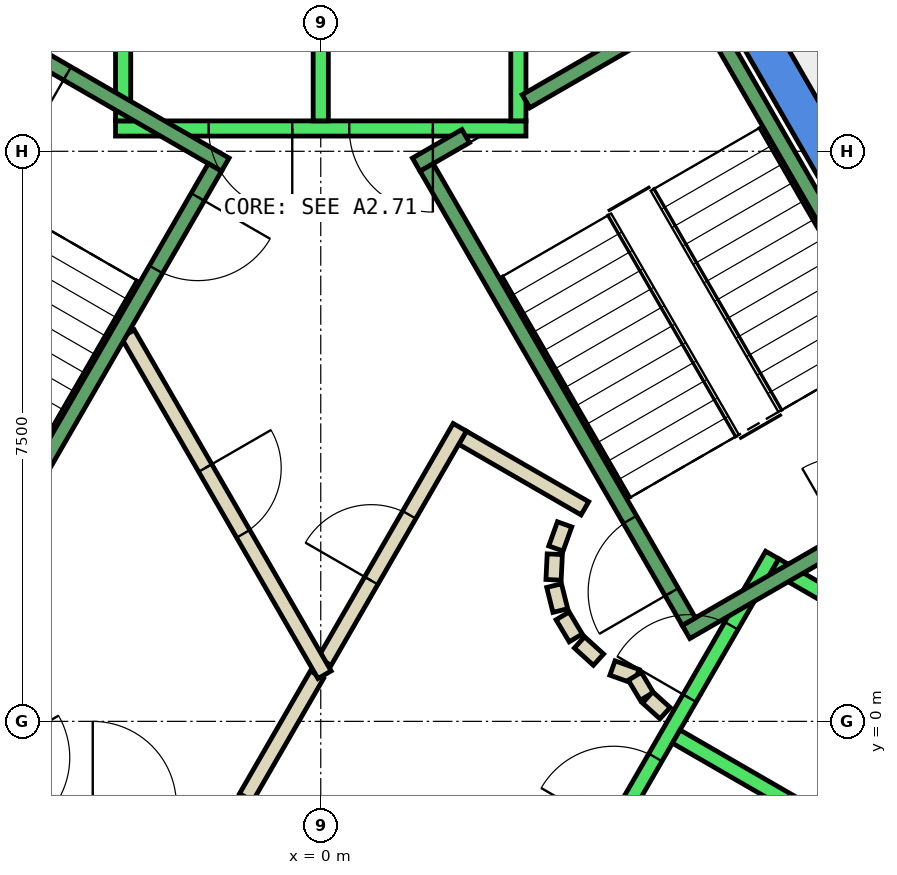
"""IFC4 building model, lengths in metres.
Left out: names, types, materials, properties, quantities, classifications, styles, units other than length and angle.
Written with IfcOpenShell. Run it as: python <this file> out.ifc"""

import sys

from ifc_helpers import new_model, si_unit, direction, frame, frame_2d, origin, place, context, subcontext, project, spatial, polyline, rectangle, outline, extrude, element, fill, save


model = new_model("IFC4")
c1 = context("Model", 3, precision=1e-05, world=origin(), true_north=direction((0.0, 1.0)))
c2 = subcontext(c1, "Body", "Model", "MODEL_VIEW")
j1 = project(units=[si_unit("LENGTHUNIT", "METRE"), si_unit("PLANEANGLEUNIT", "RADIAN")], contexts=[c1])
p1 = place(None, origin())
s1 = spatial("IfcSite", under=j1, at=p1, CompositionType="ELEMENT")
p2 = place(p1, origin())
s2 = spatial("IfcBuilding", under=s1, at=p2, CompositionType="ELEMENT")
p3 = place(p2, frame((0.0, 0.0, 335.9)))
s3 = spatial("IfcBuildingStorey", under=s2, at=p3, CompositionType="ELEMENT", Elevation=335.9)
p4 = place(p3, frame((0.0, 0.0, -0.35)))
e1 = element("IfcWall", 1, at=p4, inside=s3, PredefinedType="SHEAR", context=c2, shape_type="SweptSolid", body=[
    extrude(outline(polyline([(5.486, 9.998), (5.053, 9.748), (9.238, 2.5), (9.815, 2.5), (5.486, 9.998)])), origin(), (0.0, 0.0, 1.0), 4.4),
])
p5 = place(p3, frame((0.0, 0.0, -0.35)))
e2 = element("IfcWall", 2, at=p5, inside=s3, PredefinedType="SHEAR", context=c2, shape_type="SweptSolid", body=[
    extrude(outline(polyline([(4.907, -6.0), (9.815, 2.5), (9.238, 2.5), (4.619, -5.5), (4.907, -6.0)])), origin(), (0.0, 0.0, 1.0), 4.4),
])
p6 = place(p3, frame((-0.982, -1.0, 0.0), z_axis=(0.0, 0.0, 1.0), x_axis=(0.50024047865, 0.865886518847, 0.0)))
e3 = element("IfcWall", 3, at=p6, inside=s3, PredefinedType="PARTITIONING", context=c2, shape_type="SweptSolid", body=[
    extrude(rectangle(XDim=1.863, YDim=0.2, at=frame_2d((0.931, 0.0))), origin(), (0.0, 0.0, 1.0), 4.05),
])
p7 = place(p3, frame((1.866, 3.732, 0.0), z_axis=(0.0, 0.0, 1.0), x_axis=(0.866043361281, -0.499968895414, 0.0)))
e4 = element("IfcWall", 4, at=p7, inside=s3, PredefinedType="PARTITIONING", context=c2, shape_type="SweptSolid", body=[
    extrude(rectangle(XDim=1.858, YDim=0.2, at=frame_2d((0.929, 0.0))), origin(), (0.0, 0.0, 1.0), 4.05),
])
p8 = place(p3, frame((3.208, 2.592, 0.0), z_axis=(0.0, 0.0, 1.0), x_axis=(-0.337388820924, -0.941365382578, 0.0)))
e5 = element("IfcWall", 5, at=p8, inside=s3, PredefinedType="PARTITIONING", context=c2, shape_type="SweptSolid", body=[
    extrude(rectangle(XDim=0.338, YDim=0.2, at=frame_2d((0.169, 0.0))), origin(), (0.0, 0.0, 1.0), 4.05),
])
p9 = place(p3, frame((3.079, 2.199, 0.0), z_axis=(0.0, 0.0, 1.0), x_axis=(-0.047771483479, -0.998858290933, 0.0)))
e6 = element("IfcWall", 6, at=p9, inside=s3, PredefinedType="PARTITIONING", context=c2, shape_type="SweptSolid", body=[
    extrude(rectangle(XDim=0.337, YDim=0.2, at=frame_2d((0.169, 0.0))), origin(), (0.0, 0.0, 1.0), 4.05),
])
p10 = place(p3, frame((3.07, 1.786, 0.0), z_axis=(0.0, 0.0, 1.0), x_axis=(0.242705583207, -0.970099994784, 0.0)))
e7 = element("IfcWall", 7, at=p10, inside=s3, PredefinedType="PARTITIONING", context=c2, shape_type="SweptSolid", body=[
    extrude(rectangle(XDim=0.338, YDim=0.2, at=frame_2d((0.169, 0.0))), origin(), (0.0, 0.0, 1.0), 4.05),
])
for number, where, z_axis, x_axis in (
    (8, (3.182, 1.388, 0.0), (0.0, 0.0, 1.0), (0.512, -0.859, 0.0)),
    (9, (3.404, 1.039, 0.0), (0.0, 0.0, 1.0), (0.74, -0.672, 0.0)),
):
    element("IfcWall", number, at=place(p3, frame(where, z_axis=z_axis, x_axis=x_axis)), inside=s3, PredefinedType="PARTITIONING", context=c2, shape_type="SweptSolid", body=[
        extrude(rectangle(XDim=0.338, YDim=0.2, at=frame_2d((0.169, 0.0))), origin(), (0.0, 0.0, 1.0), 4.05),
    ])
p11 = place(p3, frame((3.838, 0.702, 0.0), z_axis=(0.0, 0.0, 1.0), x_axis=(0.941035081519, -0.338308993895, 0.0)))
e10 = element("IfcWall", 10, at=p11, inside=s3, PredefinedType="PARTITIONING", context=c2, shape_type="SweptSolid", body=[
    extrude(rectangle(XDim=0.337, YDim=0.2, at=frame_2d((0.168, 0.0))), origin(), (0.0, 0.0, 1.0), 4.05),
])
p12 = place(p3, frame((4.132, 0.593, 0.0), z_axis=(0.0, 0.0, 1.0), x_axis=(0.513561617048, -0.858052717201, 0.0)))
e11 = element("IfcWall", 11, at=p12, inside=s3, PredefinedType="PARTITIONING", context=c2, shape_type="SweptSolid", body=[
    extrude(rectangle(XDim=0.308, YDim=0.2, at=frame_2d((0.154, 0.0))), origin(), (0.0, 0.0, 1.0), 4.05),
])
p13 = place(p3, frame((4.301, 0.315, 0.0), z_axis=(0.0, 0.0, 1.0), x_axis=(0.741798017506, -0.670623367639, 0.0)))
e12 = element("IfcWall", 12, at=p13, inside=s3, PredefinedType="PARTITIONING", context=c2, shape_type="SweptSolid", body=[
    extrude(rectangle(XDim=0.309, YDim=0.2, at=frame_2d((0.154, 0.0))), origin(), (0.0, 0.0, 1.0), 4.05),
])
p14 = place(p3, frame((0.05, 0.787, 0.0), z_axis=(0.0, 0.0, 1.0), x_axis=(0.499954076797, 0.866051915934, 0.0)))
e13 = element("IfcWall", 13, at=p14, inside=s3, PredefinedType="PARTITIONING", context=c2, shape_type="SweptSolid", body=[
    extrude(rectangle(XDim=3.558, YDim=0.2, at=frame_2d((1.779, 0.0))), origin(), (0.0, 0.0, 1.0), 4.05),
])
p15 = place(p14, frame((1.229, 0.0, 0.0)))
e14 = element("IfcOpeningElement", 14, at=p15, cuts=e13, PredefinedType="OPENING", context=c2, shape_type="SweptSolid", body=[
    extrude(rectangle(XDim=1.0, YDim=2.1, at=frame_2d((0.5, 1.05))), frame((0.0, 0.11, 0.0), z_axis=(0.0, -1.0, 0.0), x_axis=(1.0, 0.0, 0.0)), (0.0, 0.0, 1.0), 0.22),
])
p16 = place(p3, frame((-2.54, 5.1, 0.0), z_axis=(0.0, 0.0, 1.0), x_axis=(0.499925051871, -0.866068670783, 0.0)))
e15 = element("IfcWall", 15, at=p16, inside=s3, PredefinedType="PARTITIONING", context=c2, shape_type="SweptSolid", body=[
    extrude(rectangle(XDim=5.181, YDim=0.2, at=frame_2d((2.59, 0.0))), origin(), (0.0, 0.0, 1.0), 4.05),
])
p17 = place(p16, frame((2.04, 0.0, 0.0)))
e16 = element("IfcOpeningElement", 16, at=p17, cuts=e15, PredefinedType="OPENING", context=c2, shape_type="SweptSolid", body=[
    extrude(rectangle(XDim=1.0, YDim=2.1, at=frame_2d((0.5, 1.05))), frame((0.0, 0.11, 0.0), z_axis=(0.0, -1.0, 0.0), x_axis=(1.0, 0.0, 0.0)), (0.0, 0.0, 1.0), 0.22),
])
p18 = place(p3, frame((2.7, 7.8, 0.0), z_axis=(0.0, 0.0, 1.0), x_axis=(-1.0, 0.0, 0.0)))
e17 = element("IfcWall", 17, at=p18, inside=s3, PredefinedType="STANDARD", context=c2, shape_type="SweptSolid", body=[
    extrude(rectangle(XDim=5.4, YDim=0.2, at=frame_2d((2.7, 0.0))), origin(), (0.0, 0.0, 1.0), 4.05),
])
p19 = place(p18, frame((1.225, 0.0, 0.0)))
e18 = element("IfcOpeningElement", 18, at=p19, cuts=e17, PredefinedType="OPENING", context=c2, shape_type="SweptSolid", body=[
    extrude(rectangle(XDim=1.1, YDim=2.1, at=frame_2d((0.55, 1.05))), frame((0.0, 0.11, 0.0), z_axis=(0.0, -1.0, 0.0), x_axis=(1.0, 0.0, 0.0)), (0.0, 0.0, 1.0), 0.22),
])
p20 = place(p18, frame((3.075, 0.0, 0.0)))
e19 = element("IfcOpeningElement", 19, at=p20, cuts=e17, PredefinedType="OPENING", context=c2, shape_type="SweptSolid", body=[
    extrude(rectangle(XDim=1.1, YDim=2.1, at=frame_2d((0.55, 1.05))), frame((0.0, 0.11, 0.0), z_axis=(0.0, -1.0, 0.0), x_axis=(1.0, 0.0, 0.0)), (0.0, 0.0, 1.0), 0.22),
])
for number, where, z_axis, x_axis in (
    (20, (2.6, 7.9, 0.0), (0.0, 0.0, 1.0), (0.0, 1.0, 0.0)),
    (21, (0.0, 7.9, 0.0), (0.0, 0.0, 1.0), (0.0, 1.0, 0.0)),
    (22, (-2.6, 7.9, 0.0), (0.0, 0.0, 1.0), (0.0, 1.0, 0.0)),
):
    element("IfcWall", number, at=place(p3, frame(where, z_axis=z_axis, x_axis=x_axis)), inside=s3, PredefinedType="STANDARD", context=c2, shape_type="SweptSolid", body=[
        extrude(rectangle(XDim=2.4, YDim=0.2, at=frame_2d((1.2, 0.0))), origin(), (0.0, 0.0, 1.0), 4.05),
    ])
p21 = place(p3, frame((-5.94, 2.188, 0.0), z_axis=(0.0, 0.0, 1.0), x_axis=(0.500034260056, -0.866005622828, 0.0)))
e23 = element("IfcWall", 23, at=p21, inside=s3, PredefinedType="STANDARD", context=c2, shape_type="SweptSolid", body=[
    extrude(rectangle(XDim=5.399, YDim=0.2, at=frame_2d((2.7, 0.0))), origin(), (0.0, 0.0, 1.0), 4.05),
])
p22 = place(p21, frame((3.075, 0.0, 0.0)))
e24 = element("IfcOpeningElement", 24, at=p22, cuts=e23, PredefinedType="OPENING", context=c2, shape_type="SweptSolid", body=[
    extrude(rectangle(XDim=1.1, YDim=2.1, at=frame_2d((0.55, 1.05))), frame((0.0, 0.11, 0.0), z_axis=(0.0, -1.0, 0.0), x_axis=(1.0, 0.0, 0.0)), (0.0, 0.0, 1.0), 0.22),
])
p23 = place(p21, frame((1.225, 0.0, 0.0)))
e25 = element("IfcOpeningElement", 25, at=p23, cuts=e23, PredefinedType="OPENING", context=c2, shape_type="SweptSolid", body=[
    extrude(rectangle(XDim=1.1, YDim=2.1, at=frame_2d((0.55, 1.05))), frame((0.0, 0.11, 0.0), z_axis=(0.0, -1.0, 0.0), x_axis=(1.0, 0.0, 0.0)), (0.0, 0.0, 1.0), 0.22),
])
p24 = place(p3, frame((3.24, -2.488, 0.0), z_axis=(0.0, 0.0, 1.0), x_axis=(0.500034260056, 0.866005622828, 0.0)))
e26 = element("IfcWall", 26, at=p24, inside=s3, PredefinedType="STANDARD", context=c2, shape_type="SweptSolid", body=[
    extrude(rectangle(XDim=5.399, YDim=0.2, at=frame_2d((2.7, 0.0))), origin(), (0.0, 0.0, 1.0), 4.05),
])
p25 = place(p24, frame((3.225, 0.0, 0.0)))
e27 = element("IfcOpeningElement", 27, at=p25, cuts=e26, PredefinedType="OPENING", context=c2, shape_type="SweptSolid", body=[
    extrude(rectangle(XDim=1.1, YDim=2.1, at=frame_2d((0.55, 1.05))), frame((0.0, 0.11, 0.0), z_axis=(0.0, -1.0, 0.0), x_axis=(1.0, 0.0, 0.0)), (0.0, 0.0, 1.0), 0.22),
])
p26 = place(p24, frame((1.225, 0.0, 0.0)))
e28 = element("IfcOpeningElement", 28, at=p26, cuts=e26, PredefinedType="OPENING", context=c2, shape_type="SweptSolid", body=[
    extrude(rectangle(XDim=1.1, YDim=2.1, at=frame_2d((0.55, 1.05))), frame((0.0, 0.11, 0.0), z_axis=(0.0, -1.0, 0.0), x_axis=(1.0, 0.0, 0.0)), (0.0, 0.0, 1.0), 0.22),
])
p27 = place(p3, frame((5.492, -3.788, 0.0), z_axis=(0.0, 0.0, 1.0), x_axis=(0.500034260056, 0.866005622828, 0.0)))
e29 = element("IfcWall", 29, at=p27, inside=s3, PredefinedType="STANDARD", context=c2, shape_type="SweptSolid", body=[
    extrude(rectangle(XDim=5.399, YDim=0.2, at=frame_2d((2.7, 0.0))), origin(), (0.0, 0.0, 1.0), 4.05),
])
for number, where, z_axis, x_axis in (
    (30, (4.677, -0.2, 0.0), (0.0, 0.0, 1.0), (0.866, -0.5, 0.0)),
    (31, (5.977, 2.052, 0.0), (0.0, 0.0, 1.0), (0.866, -0.5, 0.0)),
):
    element("IfcWall", number, at=place(p3, frame(where, z_axis=z_axis, x_axis=x_axis)), inside=s3, PredefinedType="STANDARD", context=c2, shape_type="SweptSolid", body=[
        extrude(rectangle(XDim=2.399, YDim=0.2, at=frame_2d((1.2, 0.0))), origin(), (0.0, 0.0, 1.0), 4.05),
    ])
p28 = place(p3, frame((4.806, 1.176, 0.0), z_axis=(0.0, 0.0, 1.0), x_axis=(0.866059941101, 0.499940174841, 0.0)))
e32 = element("IfcWall", 32, at=p28, inside=s3, PredefinedType="STANDARD", context=c2, shape_type="SweptSolid", body=[
    extrude(rectangle(XDim=4.4, YDim=0.2, at=frame_2d((2.2, 0.0))), origin(), (0.0, 0.0, 1.0), 4.05),
])
p29 = place(p28, frame((2.4, 0.0, 0.0)))
e33 = element("IfcOpeningElement", 33, at=p29, cuts=e32, PredefinedType="OPENING", context=c2, shape_type="SweptSolid", body=[
    extrude(rectangle(XDim=1.1, YDim=2.2, at=frame_2d((0.55, 1.1))), frame((0.0, 0.11, 0.0), z_axis=(0.0, -1.0, 0.0), x_axis=(1.0, 0.0, 0.0)), (0.0, 0.0, 1.0), 0.22),
])
p30 = place(p3, frame((2.7, 8.158, 0.0), z_axis=(0.0, 0.0, 1.0), x_axis=(0.86611865017, 0.499838457731, 0.0)))
e34 = element("IfcWall", 34, at=p30, inside=s3, PredefinedType="STANDARD", context=c2, shape_type="SweptSolid", body=[
    extrude(rectangle(XDim=2.733, YDim=0.2, at=frame_2d((1.366, 0.0))), origin(), (0.0, 0.0, 1.0), 4.05),
])
p31 = place(p3, frame((1.256, 7.324, 0.0), z_axis=(0.0, 0.0, 1.0), x_axis=(0.865915093549, 0.500191014278, 0.0)))
e35 = element("IfcWall", 35, at=p31, inside=s3, PredefinedType="STANDARD", context=c2, shape_type="SweptSolid", body=[
    extrude(rectangle(XDim=0.752, YDim=0.2, at=frame_2d((0.376, 0.0))), origin(), (0.0, 0.0, 1.0), 4.05),
])
p32 = place(p3, frame((4.843, 1.312, 0.0), z_axis=(0.0, 0.0, 1.0), x_axis=(-0.499963383562, 0.866046543262, 0.0)))
e36 = element("IfcWall", 36, at=p32, inside=s3, PredefinedType="STANDARD", context=c2, shape_type="SweptSolid", body=[
    extrude(rectangle(XDim=6.9, YDim=0.2, at=frame_2d((3.45, 0.0))), origin(), (0.0, 0.0, 1.0), 4.05),
])
p33 = place(p32, frame((0.45, 0.0, 0.0)))
e37 = element("IfcOpeningElement", 37, at=p33, cuts=e36, PredefinedType="OPENING", context=c2, shape_type="SweptSolid", body=[
    extrude(rectangle(XDim=1.1, YDim=2.2, at=frame_2d((0.55, 1.1))), frame((0.0, 0.11, 0.0), z_axis=(0.0, -1.0, 0.0), x_axis=(1.0, 0.0, 0.0)), (0.0, 0.0, 1.0), 0.22),
])
p34 = place(p3, frame((8.48, 3.412, 0.0), z_axis=(0.0, 0.0, 1.0), x_axis=(-0.499978703459, 0.866037698999, 0.0)))
e38 = element("IfcWall", 38, at=p34, inside=s3, PredefinedType="STANDARD", context=c2, shape_type="SweptSolid", body=[
    extrude(rectangle(XDim=6.9, YDim=0.2, at=frame_2d((3.45, 0.0))), origin(), (0.0, 0.0, 1.0), 4.05),
])
p35 = place(p3, frame((-1.256, 7.324, 0.0), z_axis=(0.0, 0.0, 1.0), x_axis=(-0.866046073146, 0.499964197906, 0.0)))
e39 = element("IfcWall", 39, at=p35, inside=s3, PredefinedType="STANDARD", context=c2, shape_type="SweptSolid", body=[
    extrude(rectangle(XDim=4.4, YDim=0.2, at=frame_2d((2.2, 0.0))), origin(), (0.0, 0.0, 1.0), 4.05),
])
p36 = place(p35, frame((2.4, 0.0, 0.0)))
e40 = element("IfcOpeningElement", 40, at=p36, cuts=e39, PredefinedType="OPENING", context=c2, shape_type="SweptSolid", body=[
    extrude(rectangle(XDim=1.1, YDim=2.2, at=frame_2d((0.55, 1.1))), frame((0.0, 0.11, 0.0), z_axis=(0.0, -1.0, 0.0), x_axis=(1.0, 0.0, 0.0)), (0.0, 0.0, 1.0), 0.22),
])
p37 = place(p3, frame((-1.393, 7.288, 0.0), z_axis=(0.0, 0.0, 1.0), x_axis=(-0.499963383562, -0.866046543262, 0.0)))
e41 = element("IfcWall", 41, at=p37, inside=s3, PredefinedType="STANDARD", context=c2, shape_type="SweptSolid", body=[
    extrude(rectangle(XDim=6.9, YDim=0.2, at=frame_2d((3.45, 0.0))), origin(), (0.0, 0.0, 1.0), 4.05),
])
p38 = place(p37, frame((0.45, 0.0, 0.0)))
e42 = element("IfcOpeningElement", 42, at=p38, cuts=e41, PredefinedType="OPENING", context=c2, shape_type="SweptSolid", body=[
    extrude(rectangle(XDim=1.1, YDim=2.2, at=frame_2d((0.55, 1.1))), frame((0.0, 0.11, 0.0), z_axis=(0.0, -1.0, 0.0), x_axis=(1.0, 0.0, 0.0)), (0.0, 0.0, 1.0), 0.22),
])
p39 = place(p15, origin())
e43 = element("IfcDoor", 43, at=p39, inside=s3, OperationType="SINGLE_SWING_RIGHT", PredefinedType="DOOR", context=c2, shape_type="SweptSolid", body=[
    extrude(rectangle(XDim=1.0, YDim=2.1, at=frame_2d((0.5, 1.05))), frame((0.0, 0.025, 0.0), z_axis=(0.0, -1.0, 0.0), x_axis=(1.0, 0.0, 0.0)), (0.0, 0.0, 1.0), 0.05),
])
fill(e14, e43)
p40 = place(p17, origin())
e44 = element("IfcDoor", 44, at=p40, inside=s3, OperationType="SINGLE_SWING_RIGHT", PredefinedType="DOOR", context=c2, shape_type="SweptSolid", body=[
    extrude(rectangle(XDim=1.0, YDim=2.1, at=frame_2d((0.5, 1.05))), frame((0.0, 0.025, 0.0), z_axis=(0.0, -1.0, 0.0), x_axis=(1.0, 0.0, 0.0)), (0.0, 0.0, 1.0), 0.05),
])
fill(e16, e44)
p41 = place(p19, origin())
e45 = element("IfcDoor", 45, at=p41, inside=s3, OperationType="SLIDING_TO_LEFT", PredefinedType="DOOR", context=c2, shape_type="SweptSolid", body=[
    extrude(rectangle(XDim=1.1, YDim=2.1, at=frame_2d((0.55, 1.05))), frame((0.0, 0.025, 0.0), z_axis=(0.0, -1.0, 0.0), x_axis=(1.0, 0.0, 0.0)), (0.0, 0.0, 1.0), 0.05),
])
fill(e18, e45)
p42 = place(p20, origin())
e46 = element("IfcDoor", 46, at=p42, inside=s3, OperationType="SLIDING_TO_LEFT", PredefinedType="DOOR", context=c2, shape_type="SweptSolid", body=[
    extrude(rectangle(XDim=1.1, YDim=2.1, at=frame_2d((0.55, 1.05))), frame((0.0, 0.025, 0.0), z_axis=(0.0, -1.0, 0.0), x_axis=(1.0, 0.0, 0.0)), (0.0, 0.0, 1.0), 0.05),
])
fill(e19, e46)
p43 = place(p25, origin())
e47 = element("IfcDoor", 47, at=p43, inside=s3, OperationType="SLIDING_TO_LEFT", PredefinedType="DOOR", context=c2, shape_type="SweptSolid", body=[
    extrude(rectangle(XDim=1.1, YDim=2.1, at=frame_2d((0.55, 1.05))), frame((0.0, 0.025, 0.0), z_axis=(0.0, -1.0, 0.0), x_axis=(1.0, 0.0, 0.0)), (0.0, 0.0, 1.0), 0.05),
])
fill(e27, e47)
p44 = place(p26, origin())
e48 = element("IfcDoor", 48, at=p44, inside=s3, OperationType="SLIDING_TO_LEFT", PredefinedType="DOOR", context=c2, shape_type="SweptSolid", body=[
    extrude(rectangle(XDim=1.1, YDim=2.1, at=frame_2d((0.55, 1.05))), frame((0.0, 0.025, 0.0), z_axis=(0.0, -1.0, 0.0), x_axis=(1.0, 0.0, 0.0)), (0.0, 0.0, 1.0), 0.05),
])
fill(e28, e48)
p45 = place(p33, origin())
e49 = element("IfcDoor", 49, at=p45, inside=s3, OperationType="SINGLE_SWING_LEFT", PredefinedType="DOOR", context=c2, shape_type="SweptSolid", body=[
    extrude(rectangle(XDim=1.1, YDim=2.2, at=frame_2d((0.55, 1.1))), frame((0.0, 0.025, 0.0), z_axis=(0.0, -1.0, 0.0), x_axis=(1.0, 0.0, 0.0)), (0.0, 0.0, 1.0), 0.05),
])
fill(e37, e49)
p46 = place(p38, origin())
e50 = element("IfcDoor", 50, at=p46, inside=s3, OperationType="SINGLE_SWING_LEFT", PredefinedType="DOOR", context=c2, shape_type="SweptSolid", body=[
    extrude(rectangle(XDim=1.1, YDim=2.2, at=frame_2d((0.55, 1.1))), frame((0.0, 0.025, 0.0), z_axis=(0.0, -1.0, 0.0), x_axis=(1.0, 0.0, 0.0)), (0.0, 0.0, 1.0), 0.05),
])
fill(e42, e50)
p47 = place(p36, origin())
e51 = element("IfcDoor", 51, at=p47, inside=s3, OperationType="SINGLE_SWING_LEFT", PredefinedType="DOOR", context=c2, shape_type="SweptSolid", body=[
    extrude(rectangle(XDim=1.1, YDim=2.2, at=frame_2d((0.55, 1.1))), frame((0.0, 0.025, 0.0), z_axis=(0.0, -1.0, 0.0), x_axis=(1.0, 0.0, 0.0)), (0.0, 0.0, 1.0), 0.05),
])
fill(e40, e51)
save(model, sys.argv[1])
